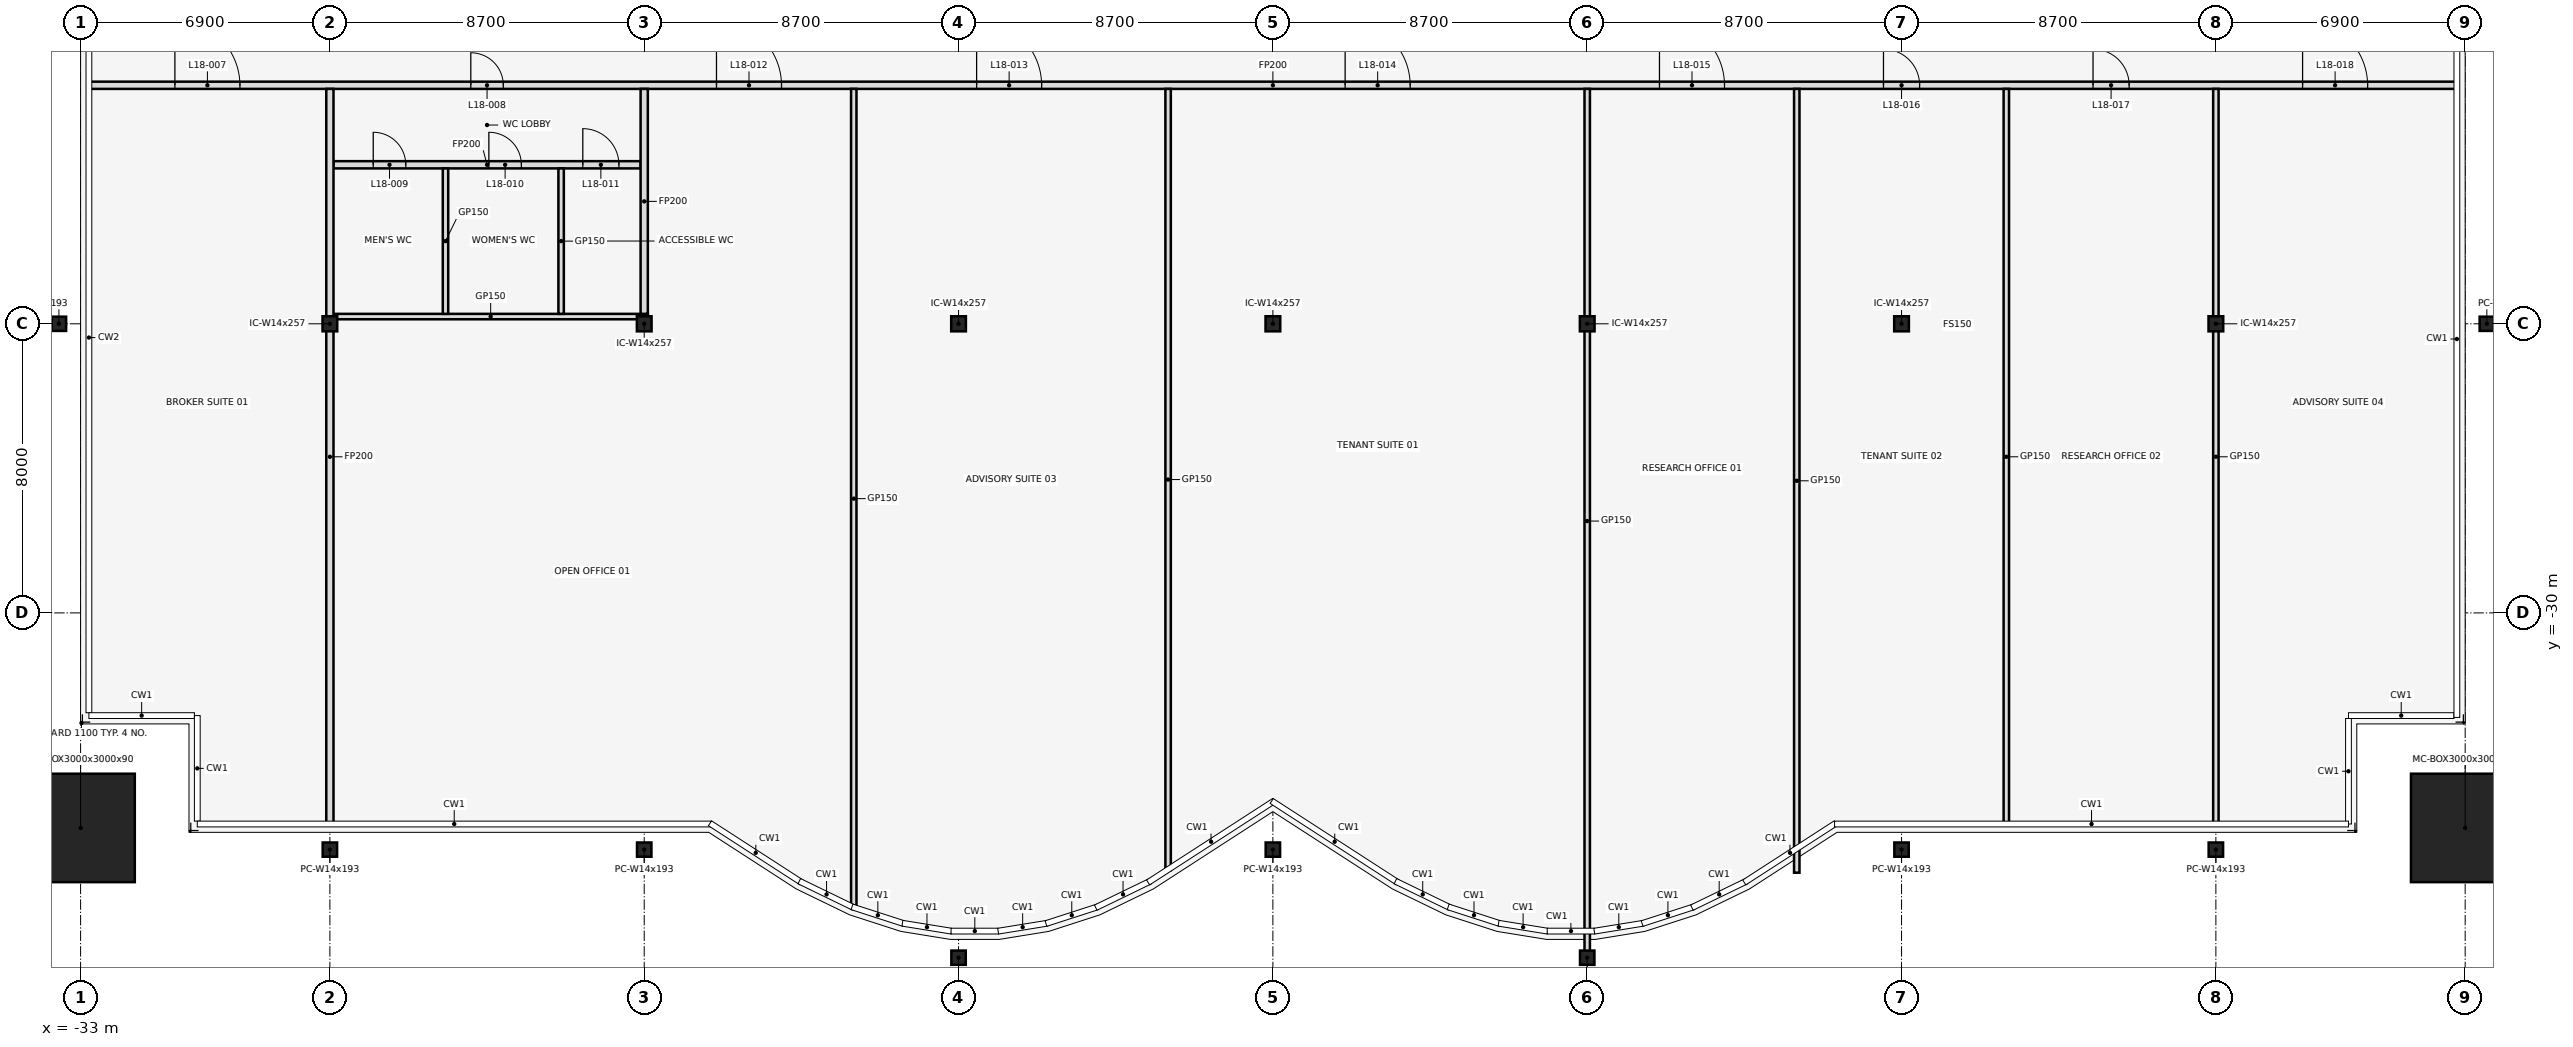
"""IFC4 building model, lengths in metres.
Left out: names, types, materials, properties, quantities, classifications, styles, units other than length and angle.
Written with IfcOpenShell. Run it as: python <this file> out.ifc"""

import sys

from ifc_helpers import new_model, si_unit, direction, frame, frame_2d, origin, origin_2d, place, context, subcontext, project, spatial, rectangle, hollow_rectangle, i_section, extrude, element, fill, save


model = new_model("IFC4")
c1 = context("Model", 3, precision=1e-05, world=origin(), true_north=direction((0.0, 1.0)))
c2 = subcontext(c1, "Body", "Model", "MODEL_VIEW")
j1 = project(units=[si_unit("LENGTHUNIT", "METRE"), si_unit("PLANEANGLEUNIT", "RADIAN")], contexts=[c1])
p1 = place(None, origin())
s1 = spatial("IfcSite", under=j1, at=p1, CompositionType="ELEMENT")
p2 = place(p1, origin())
s2 = spatial("IfcBuilding", under=s1, at=p2, CompositionType="ELEMENT")
p3 = place(p2, frame((0.0, 0.0, 89.9)))
s3 = spatial("IfcBuildingStorey", under=s2, at=p3, CompositionType="ELEMENT", Elevation=89.9)
p4 = place(p3, frame((-33.0, -35.95, 0.0), z_axis=(0.0, 0.0, 1.0), x_axis=(1.0, 0.0, 0.0)))
e1 = element("IfcColumn", 1, at=p4, inside=s3, PredefinedType="COLUMN", context=c2, shape_type="SweptSolid", body=[
    extrude(hollow_rectangle(XDim=3.0, YDim=3.0, WallThickness=0.09, at=origin_2d()), origin(), (0.0, 0.0, 1.0), 4.1),
])
for number, where, z_axis, x_axis in (
    (2, (-26.1, -36.55, 0.0), (0.0, 0.0, 1.0), (1.0, 0.0, 0.0)),
    (3, (-17.4, -36.55, 0.0), (0.0, 0.0, 1.0), (1.0, 0.0, 0.0)),
    (4, (-8.7, -39.541, 0.0), (0.0, 0.0, 1.0), (1.0, 0.0, 0.0)),
    (5, (0.0, -36.55, 0.0), (0.0, 0.0, 1.0), (1.0, 0.0, 0.0)),
    (6, (8.7, -39.541, 0.0), (0.0, 0.0, 1.0), (1.0, 0.0, 0.0)),
    (7, (17.4, -36.55, 0.0), (0.0, 0.0, 1.0), (1.0, 0.0, 0.0)),
    (8, (26.1, -36.55, 0.0), (0.0, 0.0, 1.0), (1.0, 0.0, 0.0)),
):
    element("IfcColumn", number, at=place(p3, frame(where, z_axis=z_axis, x_axis=x_axis)), inside=s3, PredefinedType="COLUMN", context=c2, shape_type="SweptSolid", body=[
        extrude(i_section(OverallWidth=0.399, OverallDepth=0.394, WebThickness=0.023, FlangeThickness=0.037, at=origin_2d()), origin(), (0.0, 0.0, 1.0), 4.1),
    ])
p5 = place(p3, frame((33.0, -35.95, 0.0), z_axis=(0.0, 0.0, 1.0), x_axis=(1.0, 0.0, 0.0)))
e9 = element("IfcColumn", 9, at=p5, inside=s3, PredefinedType="COLUMN", context=c2, shape_type="SweptSolid", body=[
    extrude(hollow_rectangle(XDim=3.0, YDim=3.0, WallThickness=0.09, at=origin_2d()), origin(), (0.0, 0.0, 1.0), 4.1),
])
for number, where, z_axis, x_axis in (
    (10, (-33.6, -22.0, 0.0), (0.0, 0.0, 1.0), (1.0, 0.0, 0.0)),
    (11, (33.6, -22.0, 0.0), (0.0, 0.0, 1.0), (1.0, 0.0, 0.0)),
):
    element("IfcColumn", number, at=place(p3, frame(where, z_axis=z_axis, x_axis=x_axis)), inside=s3, PredefinedType="COLUMN", context=c2, shape_type="SweptSolid", body=[
        extrude(i_section(OverallWidth=0.399, OverallDepth=0.394, WebThickness=0.023, FlangeThickness=0.037, at=origin_2d()), origin(), (0.0, 0.0, 1.0), 4.1),
    ])
for number, where, z_axis, x_axis in (
    (12, (-26.1, -22.0, 0.0), (0.0, 0.0, 1.0), (1.0, 0.0, 0.0)),
    (13, (-17.4, -22.0, 0.0), (0.0, 0.0, 1.0), (1.0, 0.0, 0.0)),
    (14, (-8.7, -22.0, 0.0), (0.0, 0.0, 1.0), (1.0, 0.0, 0.0)),
    (15, (0.0, -22.0, 0.0), (0.0, 0.0, 1.0), (1.0, 0.0, 0.0)),
    (16, (8.7, -22.0, 0.0), (0.0, 0.0, 1.0), (1.0, 0.0, 0.0)),
    (17, (17.4, -22.0, 0.0), (0.0, 0.0, 1.0), (1.0, 0.0, 0.0)),
    (18, (26.1, -22.0, 0.0), (0.0, 0.0, 1.0), (1.0, 0.0, 0.0)),
):
    element("IfcColumn", number, at=place(p3, frame(where, z_axis=z_axis, x_axis=x_axis)), inside=s3, PredefinedType="COLUMN", context=c2, shape_type="SweptSolid", body=[
        extrude(i_section(OverallWidth=0.406, OverallDepth=0.417, WebThickness=0.03, FlangeThickness=0.048, at=origin_2d()), origin(), (0.0, 0.0, 1.0), 4.1),
    ])
p6 = place(p3, frame((-26.0, -21.8, 0.0), z_axis=(0.0, 0.0, 1.0), x_axis=(1.0, 0.0, 0.0)))
e19 = element("IfcWall", 19, at=p6, inside=s3, PredefinedType="PARTITIONING", context=c2, shape_type="SweptSolid", body=[
    extrude(rectangle(XDim=8.7, YDim=0.15, at=frame_2d((4.35, 0.0))), origin(), (0.0, 0.0, 1.0), 3.018),
])
p7 = place(p3, frame((-26.0, -17.6, 0.0), z_axis=(0.0, 0.0, 1.0), x_axis=(1.0, 0.0, 0.0)))
e20 = element("IfcWall", 20, at=p7, inside=s3, PredefinedType="PARTITIONING", context=c2, shape_type="SweptSolid", body=[
    extrude(rectangle(XDim=8.5, YDim=0.2, at=frame_2d((4.25, 0.0))), origin(), (0.0, 0.0, 1.0), 3.018),
])
p8 = place(p7, frame((1.1, 0.0, 0.0)))
e21 = element("IfcOpeningElement", 21, at=p8, cuts=e20, PredefinedType="OPENING", context=c2, shape_type="SweptSolid", body=[
    extrude(rectangle(XDim=0.9, YDim=2.1, at=frame_2d((0.45, 1.05))), frame((0.0, 0.112, 0.0), z_axis=(0.0, -1.0, 0.0), x_axis=(1.0, 0.0, 0.0)), (0.0, 0.0, 1.0), 0.224),
])
p9 = place(p7, frame((4.3, 0.0, 0.0)))
e22 = element("IfcOpeningElement", 22, at=p9, cuts=e20, PredefinedType="OPENING", context=c2, shape_type="SweptSolid", body=[
    extrude(rectangle(XDim=0.9, YDim=2.1, at=frame_2d((0.45, 1.05))), frame((0.0, 0.112, 0.0), z_axis=(0.0, -1.0, 0.0), x_axis=(1.0, 0.0, 0.0)), (0.0, 0.0, 1.0), 0.224),
])
p10 = place(p7, frame((6.9, 0.0, 0.0)))
e23 = element("IfcOpeningElement", 23, at=p10, cuts=e20, PredefinedType="OPENING", context=c2, shape_type="SweptSolid", body=[
    extrude(rectangle(XDim=1.0, YDim=2.1, at=frame_2d((0.5, 1.05))), frame((0.0, 0.112, 0.0), z_axis=(0.0, -1.0, 0.0), x_axis=(1.0, 0.0, 0.0)), (0.0, 0.0, 1.0), 0.224),
])
p11 = place(p3, frame((-32.79, -15.4, 0.0), z_axis=(0.0, 0.0, 1.0), x_axis=(1.0, 0.0, 0.0)))
e24 = element("IfcWall", 24, at=p11, inside=s3, PredefinedType="PARTITIONING", context=c2, shape_type="SweptSolid", body=[
    extrude(rectangle(XDim=65.58, YDim=0.2, at=frame_2d((32.79, 0.0))), origin(), (0.0, 0.0, 1.0), 3.018),
])
p12 = place(p11, frame((2.4, 0.0, 0.0)))
e25 = element("IfcOpeningElement", 25, at=p12, cuts=e24, PredefinedType="OPENING", context=c2, shape_type="SweptSolid", body=[
    extrude(rectangle(XDim=1.8, YDim=2.1, at=frame_2d((0.9, 1.05))), frame((0.0, 0.112, 0.0), z_axis=(0.0, -1.0, 0.0), x_axis=(1.0, 0.0, 0.0)), (0.0, 0.0, 1.0), 0.224),
])
p13 = place(p11, frame((10.59, 0.0, 0.0)))
e26 = element("IfcOpeningElement", 26, at=p13, cuts=e24, PredefinedType="OPENING", context=c2, shape_type="SweptSolid", body=[
    extrude(rectangle(XDim=0.9, YDim=2.1, at=frame_2d((0.45, 1.05))), frame((0.0, 0.112, 0.0), z_axis=(0.0, -1.0, 0.0), x_axis=(1.0, 0.0, 0.0)), (0.0, 0.0, 1.0), 0.224),
])
p14 = place(p11, frame((17.39, 0.0, 0.0)))
e27 = element("IfcOpeningElement", 27, at=p14, cuts=e24, PredefinedType="OPENING", context=c2, shape_type="SweptSolid", body=[
    extrude(rectangle(XDim=1.8, YDim=2.1, at=frame_2d((0.9, 1.05))), frame((0.0, 0.112, 0.0), z_axis=(0.0, -1.0, 0.0), x_axis=(1.0, 0.0, 0.0)), (0.0, 0.0, 1.0), 0.224),
])
p15 = place(p11, frame((24.59, 0.0, 0.0)))
e28 = element("IfcOpeningElement", 28, at=p15, cuts=e24, PredefinedType="OPENING", context=c2, shape_type="SweptSolid", body=[
    extrude(rectangle(XDim=1.8, YDim=2.1, at=frame_2d((0.9, 1.05))), frame((0.0, 0.112, 0.0), z_axis=(0.0, -1.0, 0.0), x_axis=(1.0, 0.0, 0.0)), (0.0, 0.0, 1.0), 0.224),
])
p16 = place(p11, frame((34.79, 0.0, 0.0)))
e29 = element("IfcOpeningElement", 29, at=p16, cuts=e24, PredefinedType="OPENING", context=c2, shape_type="SweptSolid", body=[
    extrude(rectangle(XDim=1.8, YDim=2.1, at=frame_2d((0.9, 1.05))), frame((0.0, 0.112, 0.0), z_axis=(0.0, -1.0, 0.0), x_axis=(1.0, 0.0, 0.0)), (0.0, 0.0, 1.0), 0.224),
])
p17 = place(p11, frame((43.49, 0.0, 0.0)))
e30 = element("IfcOpeningElement", 30, at=p17, cuts=e24, PredefinedType="OPENING", context=c2, shape_type="SweptSolid", body=[
    extrude(rectangle(XDim=1.8, YDim=2.1, at=frame_2d((0.9, 1.05))), frame((0.0, 0.112, 0.0), z_axis=(0.0, -1.0, 0.0), x_axis=(1.0, 0.0, 0.0)), (0.0, 0.0, 1.0), 0.224),
])
p18 = place(p11, frame((49.69, 0.0, 0.0)))
e31 = element("IfcOpeningElement", 31, at=p18, cuts=e24, PredefinedType="OPENING", context=c2, shape_type="SweptSolid", body=[
    extrude(rectangle(XDim=1.0, YDim=2.1, at=frame_2d((0.5, 1.05))), frame((0.0, 0.112, 0.0), z_axis=(0.0, -1.0, 0.0), x_axis=(1.0, 0.0, 0.0)), (0.0, 0.0, 1.0), 0.224),
])
p19 = place(p11, frame((55.49, 0.0, 0.0)))
e32 = element("IfcOpeningElement", 32, at=p19, cuts=e24, PredefinedType="OPENING", context=c2, shape_type="SweptSolid", body=[
    extrude(rectangle(XDim=1.0, YDim=2.1, at=frame_2d((0.5, 1.05))), frame((0.0, 0.112, 0.0), z_axis=(0.0, -1.0, 0.0), x_axis=(1.0, 0.0, 0.0)), (0.0, 0.0, 1.0), 0.224),
])
p20 = place(p11, frame((61.29, 0.0, 0.0)))
e33 = element("IfcOpeningElement", 33, at=p20, cuts=e24, PredefinedType="OPENING", context=c2, shape_type="SweptSolid", body=[
    extrude(rectangle(XDim=1.8, YDim=2.1, at=frame_2d((0.9, 1.05))), frame((0.0, 0.112, 0.0), z_axis=(0.0, -1.0, 0.0), x_axis=(1.0, 0.0, 0.0)), (0.0, 0.0, 1.0), 0.224),
])
p21 = place(p3, frame((-26.1, -35.86, 0.0), z_axis=(0.0, 0.0, 1.0), x_axis=(0.0, 1.0, 0.0)))
e34 = element("IfcWall", 34, at=p21, inside=s3, PredefinedType="PARTITIONING", context=c2, shape_type="SweptSolid", body=[
    extrude(rectangle(XDim=20.36, YDim=0.2, at=frame_2d((10.18, 0.0))), origin(), (0.0, 0.0, 1.0), 3.018),
])
for number, where, z_axis, x_axis in (
    (35, (-22.9, -21.725, 0.0), (0.0, 0.0, 1.0), (0.0, 1.0, 0.0)),
    (36, (-19.7, -21.725, 0.0), (0.0, 0.0, 1.0), (0.0, 1.0, 0.0)),
):
    element("IfcWall", number, at=place(p3, frame(where, z_axis=z_axis, x_axis=x_axis)), inside=s3, PredefinedType="PARTITIONING", context=c2, shape_type="SweptSolid", body=[
        extrude(rectangle(XDim=4.025, YDim=0.15, at=frame_2d((2.013, 0.0))), origin(), (0.0, 0.0, 1.0), 3.018),
    ])
p22 = place(p3, frame((-17.4, -21.725, 0.0), z_axis=(0.0, 0.0, 1.0), x_axis=(0.0, 1.0, 0.0)))
e37 = element("IfcWall", 37, at=p22, inside=s3, PredefinedType="PARTITIONING", context=c2, shape_type="SweptSolid", body=[
    extrude(rectangle(XDim=6.225, YDim=0.2, at=frame_2d((3.113, 0.0))), origin(), (0.0, 0.0, 1.0), 3.018),
])
p23 = place(p3, frame((-11.6, -38.176, 0.0), z_axis=(0.0, 0.0, 1.0), x_axis=(0.0, 1.0, 0.0)))
e38 = element("IfcWall", 38, at=p23, inside=s3, PredefinedType="PARTITIONING", context=c2, shape_type="SweptSolid", body=[
    extrude(rectangle(XDim=22.676, YDim=0.15, at=frame_2d((11.338, 0.0))), origin(), (0.0, 0.0, 1.0), 3.018),
])
p24 = place(p3, frame((-2.9, -37.12, 0.0), z_axis=(0.0, 0.0, 1.0), x_axis=(0.0, 1.0, 0.0)))
e39 = element("IfcWall", 39, at=p24, inside=s3, PredefinedType="PARTITIONING", context=c2, shape_type="SweptSolid", body=[
    extrude(rectangle(XDim=21.62, YDim=0.15, at=frame_2d((10.81, 0.0))), origin(), (0.0, 0.0, 1.0), 3.018),
])
p25 = place(p3, frame((8.7, -39.417, 0.0), z_axis=(0.0, 0.0, 1.0), x_axis=(0.0, 1.0, 0.0)))
e40 = element("IfcWall", 40, at=p25, inside=s3, PredefinedType="PARTITIONING", context=c2, shape_type="SweptSolid", body=[
    extrude(rectangle(XDim=23.917, YDim=0.15, at=frame_2d((11.958, 0.0))), origin(), (0.0, 0.0, 1.0), 3.018),
])
p26 = place(p3, frame((14.5, -37.189, 0.0), z_axis=(0.0, 0.0, 1.0), x_axis=(0.0, 1.0, 0.0)))
e41 = element("IfcWall", 41, at=p26, inside=s3, PredefinedType="PARTITIONING", context=c2, shape_type="SweptSolid", body=[
    extrude(rectangle(XDim=21.689, YDim=0.15, at=frame_2d((10.844, 0.0))), origin(), (0.0, 0.0, 1.0), 3.018),
])
for number, where, z_axis, x_axis in (
    (42, (20.3, -35.86, 0.0), (0.0, 0.0, 1.0), (0.0, 1.0, 0.0)),
    (43, (26.1, -35.86, 0.0), (0.0, 0.0, 1.0), (0.0, 1.0, 0.0)),
):
    element("IfcWall", number, at=place(p3, frame(where, z_axis=z_axis, x_axis=x_axis)), inside=s3, PredefinedType="PARTITIONING", context=c2, shape_type="SweptSolid", body=[
        extrude(rectangle(XDim=20.36, YDim=0.15, at=frame_2d((10.18, 0.0))), origin(), (0.0, 0.0, 1.0), 3.018),
    ])
p27 = place(p12, origin())
e44 = element("IfcDoor", 44, at=p27, inside=s3, OperationType="SINGLE_SWING_LEFT", PredefinedType="DOOR", context=c2, shape_type="SweptSolid", body=[
    extrude(rectangle(XDim=1.8, YDim=2.1, at=frame_2d((0.9, 1.05))), frame((0.0, 0.025, 0.0), z_axis=(0.0, -1.0, 0.0), x_axis=(1.0, 0.0, 0.0)), (0.0, 0.0, 1.0), 0.05),
])
fill(e25, e44)
p28 = place(p13, frame((0.9, 0.0, 0.0), z_axis=(0.0, 0.0, 1.0), x_axis=(-1.0, 0.0, 0.0)))
e45 = element("IfcDoor", 45, at=p28, inside=s3, OperationType="SINGLE_SWING_RIGHT", PredefinedType="DOOR", context=c2, shape_type="SweptSolid", body=[
    extrude(rectangle(XDim=0.9, YDim=2.1, at=frame_2d((0.45, 1.05))), frame((0.0, 0.025, 0.0), z_axis=(0.0, -1.0, 0.0), x_axis=(1.0, 0.0, 0.0)), (0.0, 0.0, 1.0), 0.05),
])
fill(e26, e45)
p29 = place(p8, frame((0.9, 0.0, 0.0), z_axis=(0.0, 0.0, 1.0), x_axis=(-1.0, 0.0, 0.0)))
e46 = element("IfcDoor", 46, at=p29, inside=s3, OperationType="SINGLE_SWING_RIGHT", PredefinedType="DOOR", context=c2, shape_type="SweptSolid", body=[
    extrude(rectangle(XDim=0.9, YDim=2.1, at=frame_2d((0.45, 1.05))), frame((0.0, 0.025, 0.0), z_axis=(0.0, -1.0, 0.0), x_axis=(1.0, 0.0, 0.0)), (0.0, 0.0, 1.0), 0.05),
])
fill(e21, e46)
p30 = place(p9, frame((0.9, 0.0, 0.0), z_axis=(0.0, 0.0, 1.0), x_axis=(-1.0, 0.0, 0.0)))
e47 = element("IfcDoor", 47, at=p30, inside=s3, OperationType="SINGLE_SWING_LEFT", PredefinedType="DOOR", context=c2, shape_type="SweptSolid", body=[
    extrude(rectangle(XDim=0.9, YDim=2.1, at=frame_2d((0.45, 1.05))), frame((0.0, 0.025, 0.0), z_axis=(0.0, -1.0, 0.0), x_axis=(1.0, 0.0, 0.0)), (0.0, 0.0, 1.0), 0.05),
])
fill(e22, e47)
p31 = place(p10, frame((1.0, 0.0, 0.0), z_axis=(0.0, 0.0, 1.0), x_axis=(-1.0, 0.0, 0.0)))
e48 = element("IfcDoor", 48, at=p31, inside=s3, OperationType="SINGLE_SWING_RIGHT", PredefinedType="DOOR", context=c2, shape_type="SweptSolid", body=[
    extrude(rectangle(XDim=1.0, YDim=2.1, at=frame_2d((0.5, 1.05))), frame((0.0, 0.025, 0.0), z_axis=(0.0, -1.0, 0.0), x_axis=(1.0, 0.0, 0.0)), (0.0, 0.0, 1.0), 0.05),
])
fill(e23, e48)
p32 = place(p14, origin())
e49 = element("IfcDoor", 49, at=p32, inside=s3, OperationType="SINGLE_SWING_LEFT", PredefinedType="DOOR", context=c2, shape_type="SweptSolid", body=[
    extrude(rectangle(XDim=1.8, YDim=2.1, at=frame_2d((0.9, 1.05))), frame((0.0, 0.025, 0.0), z_axis=(0.0, -1.0, 0.0), x_axis=(1.0, 0.0, 0.0)), (0.0, 0.0, 1.0), 0.05),
])
fill(e27, e49)
p33 = place(p15, origin())
e50 = element("IfcDoor", 50, at=p33, inside=s3, OperationType="SINGLE_SWING_LEFT", PredefinedType="DOOR", context=c2, shape_type="SweptSolid", body=[
    extrude(rectangle(XDim=1.8, YDim=2.1, at=frame_2d((0.9, 1.05))), frame((0.0, 0.025, 0.0), z_axis=(0.0, -1.0, 0.0), x_axis=(1.0, 0.0, 0.0)), (0.0, 0.0, 1.0), 0.05),
])
fill(e28, e50)
p34 = place(p16, origin())
e51 = element("IfcDoor", 51, at=p34, inside=s3, OperationType="SINGLE_SWING_LEFT", PredefinedType="DOOR", context=c2, shape_type="SweptSolid", body=[
    extrude(rectangle(XDim=1.8, YDim=2.1, at=frame_2d((0.9, 1.05))), frame((0.0, 0.025, 0.0), z_axis=(0.0, -1.0, 0.0), x_axis=(1.0, 0.0, 0.0)), (0.0, 0.0, 1.0), 0.05),
])
fill(e29, e51)
p35 = place(p17, origin())
e52 = element("IfcDoor", 52, at=p35, inside=s3, OperationType="SINGLE_SWING_LEFT", PredefinedType="DOOR", context=c2, shape_type="SweptSolid", body=[
    extrude(rectangle(XDim=1.8, YDim=2.1, at=frame_2d((0.9, 1.05))), frame((0.0, 0.025, 0.0), z_axis=(0.0, -1.0, 0.0), x_axis=(1.0, 0.0, 0.0)), (0.0, 0.0, 1.0), 0.05),
])
fill(e30, e52)
p36 = place(p18, frame((1.0, 0.0, 0.0), z_axis=(0.0, 0.0, 1.0), x_axis=(-1.0, 0.0, 0.0)))
e53 = element("IfcDoor", 53, at=p36, inside=s3, OperationType="SINGLE_SWING_LEFT", PredefinedType="DOOR", context=c2, shape_type="SweptSolid", body=[
    extrude(rectangle(XDim=1.0, YDim=2.1, at=frame_2d((0.5, 1.05))), frame((0.0, 0.025, 0.0), z_axis=(0.0, -1.0, 0.0), x_axis=(1.0, 0.0, 0.0)), (0.0, 0.0, 1.0), 0.05),
])
fill(e31, e53)
p37 = place(p19, frame((1.0, 0.0, 0.0), z_axis=(0.0, 0.0, 1.0), x_axis=(-1.0, 0.0, 0.0)))
e54 = element("IfcDoor", 54, at=p37, inside=s3, OperationType="SINGLE_SWING_RIGHT", PredefinedType="DOOR", context=c2, shape_type="SweptSolid", body=[
    extrude(rectangle(XDim=1.0, YDim=2.1, at=frame_2d((0.5, 1.05))), frame((0.0, 0.025, 0.0), z_axis=(0.0, -1.0, 0.0), x_axis=(1.0, 0.0, 0.0)), (0.0, 0.0, 1.0), 0.05),
])
fill(e32, e54)
p38 = place(p20, origin())
e55 = element("IfcDoor", 55, at=p38, inside=s3, OperationType="SINGLE_SWING_LEFT", PredefinedType="DOOR", context=c2, shape_type="SweptSolid", body=[
    extrude(rectangle(XDim=1.8, YDim=2.1, at=frame_2d((0.9, 1.05))), frame((0.0, 0.025, 0.0), z_axis=(0.0, -1.0, 0.0), x_axis=(1.0, 0.0, 0.0)), (0.0, 0.0, 1.0), 0.05),
])
fill(e33, e55)
save(model, sys.argv[1])
